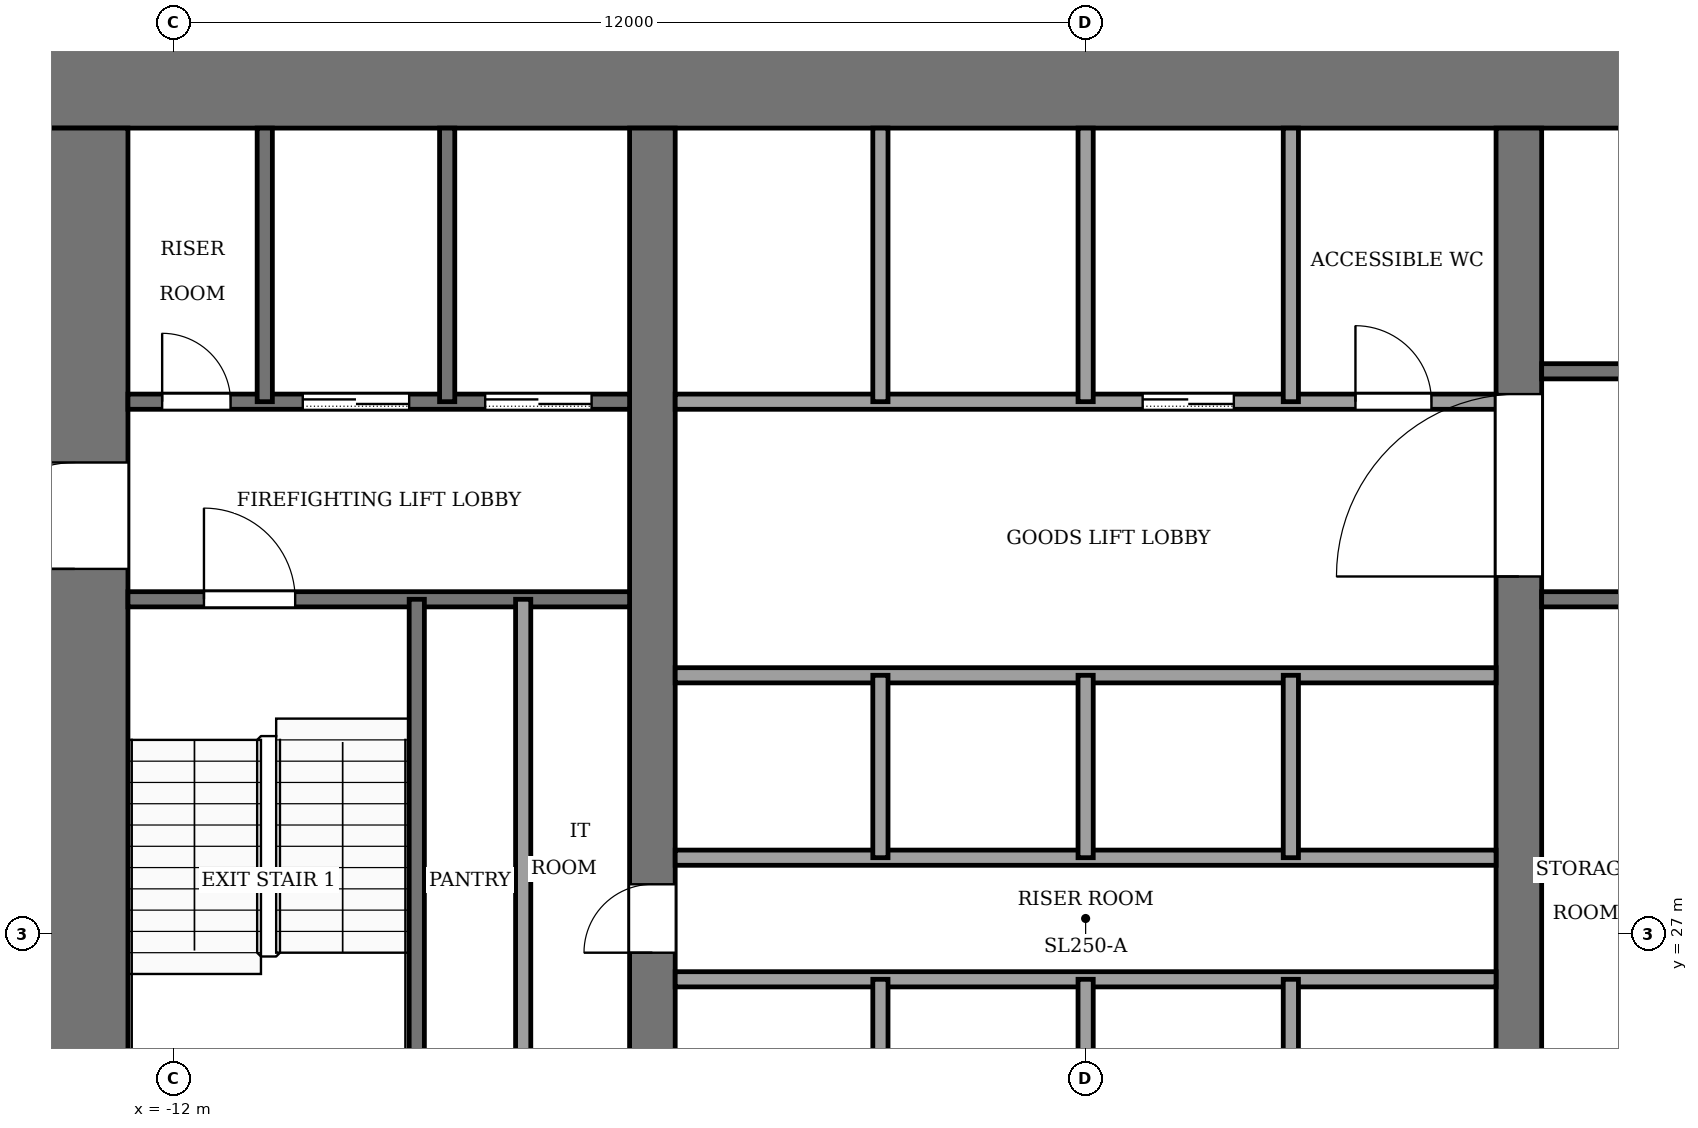
"""IFC4 building model, lengths in metres.
Left out: names, types, materials, properties, quantities, classifications, styles, units other than length and angle.
Written with IfcOpenShell. Run it as: python <this file> out.ifc"""

import sys

from ifc_helpers import new_model, si_unit, direction, frame, frame_2d, origin, place, context, subcontext, project, spatial, rectangle, extrude, element, fill, save


model = new_model("IFC4")
c1 = context("Model", 3, precision=1e-05, world=origin(), true_north=direction((0.0, 1.0)))
c2 = subcontext(c1, "Body", "Model", "MODEL_VIEW")
j1 = project(units=[si_unit("LENGTHUNIT", "METRE"), si_unit("PLANEANGLEUNIT", "RADIAN")], contexts=[c1])
p1 = place(None, origin())
s1 = spatial("IfcSite", under=j1, at=p1, CompositionType="ELEMENT")
p2 = place(p1, origin())
s2 = spatial("IfcBuilding", under=s1, at=p2, CompositionType="ELEMENT")
p3 = place(p2, frame((0.0, 0.0, 30.0)))
s3 = spatial("IfcBuildingStorey", under=s2, at=p3, CompositionType="ELEMENT", Elevation=30.0)
p4 = place(p3, frame((-14.0, 38.3, -0.13), z_axis=(0.0, 0.0, 1.0), x_axis=(1.0, 0.0, 0.0)))
e1 = element("IfcWall", 1, at=p4, inside=s3, PredefinedType="SHEAR", context=c2, shape_type="SweptSolid", body=[
    extrude(rectangle(XDim=28.0, YDim=1.4, at=frame_2d((14.0, 0.0))), origin(), (0.0, 0.0, 1.0), 4.0),
])
p5 = place(p3, frame((-13.3, 18.4, -0.13), z_axis=(0.0, 0.0, 1.0), x_axis=(0.0, 1.0, 0.0)))
e2 = element("IfcWall", 2, at=p5, inside=s3, PredefinedType="SHEAR", context=c2, shape_type="SweptSolid", body=[
    extrude(rectangle(XDim=19.2, YDim=1.4, at=frame_2d((9.6, 0.0))), origin(), (0.0, 0.0, 1.0), 4.0),
])
p6 = place(p5, frame((2.8, 0.0, 0.13)))
e3 = element("IfcOpeningElement", 3, at=p6, cuts=e2, PredefinedType="OPENING", context=c2, shape_type="SweptSolid", body=[
    extrude(rectangle(XDim=2.4, YDim=2.4, at=frame_2d((1.2, 1.2))), frame((0.0, 0.71, 0.0), z_axis=(0.0, -1.0, 0.0), x_axis=(1.0, 0.0, 0.0)), (0.0, 0.0, 1.0), 1.42),
])
p7 = place(p5, frame((13.4, 0.0, 0.13)))
e4 = element("IfcOpeningElement", 4, at=p7, cuts=e2, PredefinedType="OPENING", context=c2, shape_type="SweptSolid", body=[
    extrude(rectangle(XDim=1.4, YDim=2.2, at=frame_2d((0.7, 1.1))), frame((0.0, 0.71, 0.0), z_axis=(0.0, -1.0, 0.0), x_axis=(1.0, 0.0, 0.0)), (0.0, 0.0, 1.0), 1.42),
])
p8 = place(p3, frame((-5.7, 18.4, -0.13), z_axis=(0.0, 0.0, 1.0), x_axis=(0.0, 1.0, 0.0)))
e5 = element("IfcWall", 5, at=p8, inside=s3, PredefinedType="SHEAR", context=c2, shape_type="SweptSolid", body=[
    extrude(rectangle(XDim=19.2, YDim=0.6, at=frame_2d((9.6, 0.0))), origin(), (0.0, 0.0, 1.0), 4.0),
])
p9 = place(p8, frame((8.35, 0.0, 0.13)))
e6 = element("IfcOpeningElement", 6, at=p9, cuts=e5, PredefinedType="OPENING", context=c2, shape_type="SweptSolid", body=[
    extrude(rectangle(XDim=0.9, YDim=2.1, at=frame_2d((0.45, 1.05))), frame((0.0, 0.31, 0.0), z_axis=(0.0, -1.0, 0.0), x_axis=(1.0, 0.0, 0.0)), (0.0, 0.0, 1.0), 0.62),
])
p10 = place(p3, frame((5.7, 18.4, -0.13), z_axis=(0.0, 0.0, 1.0), x_axis=(0.0, 1.0, 0.0)))
e7 = element("IfcWall", 7, at=p10, inside=s3, PredefinedType="SHEAR", context=c2, shape_type="SweptSolid", body=[
    extrude(rectangle(XDim=19.2, YDim=0.6, at=frame_2d((9.6, 0.0))), origin(), (0.0, 0.0, 1.0), 4.0),
])
p11 = place(p10, frame((13.3, 0.0, 0.13)))
e8 = element("IfcOpeningElement", 8, at=p11, cuts=e7, PredefinedType="OPENING", context=c2, shape_type="SweptSolid", body=[
    extrude(rectangle(XDim=2.4, YDim=2.4, at=frame_2d((1.2, 1.2))), frame((0.0, 0.31, 0.0), z_axis=(0.0, -1.0, 0.0), x_axis=(1.0, 0.0, 0.0)), (0.0, 0.0, 1.0), 0.62),
])
for number, where, z_axis, x_axis in (
    (9, (-5.4, 26.4, 0.0), (0.0, 0.0, 1.0), (1.0, 0.0, 0.0)),
    (10, (-5.4, 28.0, 0.0), (0.0, 0.0, 1.0), (1.0, 0.0, 0.0)),
    (11, (-5.4, 30.4, 0.0), (0.0, 0.0, 1.0), (1.0, 0.0, 0.0)),
):
    element("IfcWall", number, at=place(p3, frame(where, z_axis=z_axis, x_axis=x_axis)), inside=s3, PredefinedType="PARTITIONING", context=c2, shape_type="SweptSolid", body=[
        extrude(rectangle(XDim=10.8, YDim=0.2, at=frame_2d((5.4, 0.0))), origin(), (0.0, 0.0, 1.0), 3.87),
    ])
p12 = place(p3, frame((-12.6, 31.4, 0.0), z_axis=(0.0, 0.0, 1.0), x_axis=(1.0, 0.0, 0.0)))
e12 = element("IfcWall", 12, at=p12, inside=s3, PredefinedType="PARTITIONING", context=c2, shape_type="SweptSolid", body=[
    extrude(rectangle(XDim=6.6, YDim=0.2, at=frame_2d((3.3, 0.0))), origin(), (0.0, 0.0, 1.0), 3.87),
])
p13 = place(p12, frame((1.0, 0.0, 0.0)))
e13 = element("IfcOpeningElement", 13, at=p13, cuts=e12, PredefinedType="OPENING", context=c2, shape_type="SweptSolid", body=[
    extrude(rectangle(XDim=1.2, YDim=2.2, at=frame_2d((0.6, 1.1))), frame((0.0, 0.11, 0.0), z_axis=(0.0, -1.0, 0.0), x_axis=(1.0, 0.0, 0.0)), (0.0, 0.0, 1.0), 0.22),
])
p14 = place(p3, frame((6.0, 31.4, 0.0), z_axis=(0.0, 0.0, 1.0), x_axis=(1.0, 0.0, 0.0)))
e14 = element("IfcWall", 14, at=p14, inside=s3, PredefinedType="PARTITIONING", context=c2, shape_type="SweptSolid", body=[
    extrude(rectangle(XDim=6.6, YDim=0.2, at=frame_2d((3.3, 0.0))), origin(), (0.0, 0.0, 1.0), 3.87),
])
p15 = place(p3, frame((-12.6, 34.0, 0.0), z_axis=(0.0, 0.0, 1.0), x_axis=(1.0, 0.0, 0.0)))
e15 = element("IfcWall", 15, at=p15, inside=s3, PredefinedType="PARTITIONING", context=c2, shape_type="SweptSolid", body=[
    extrude(rectangle(XDim=6.6, YDim=0.2, at=frame_2d((3.3, 0.0))), origin(), (0.0, 0.0, 1.0), 3.87),
])
p16 = place(p15, frame((4.7, 0.0, 0.0)))
e16 = element("IfcOpeningElement", 16, at=p16, cuts=e15, PredefinedType="OPENING", context=c2, shape_type="SweptSolid", body=[
    extrude(rectangle(XDim=1.4, YDim=2.2, at=frame_2d((0.7, 1.1))), frame((0.0, 0.11, 0.0), z_axis=(0.0, -1.0, 0.0), x_axis=(1.0, 0.0, 0.0)), (0.0, 0.0, 1.0), 0.22),
])
p17 = place(p15, frame((2.3, 0.0, 0.0)))
e17 = element("IfcOpeningElement", 17, at=p17, cuts=e15, PredefinedType="OPENING", context=c2, shape_type="SweptSolid", body=[
    extrude(rectangle(XDim=1.4, YDim=2.2, at=frame_2d((0.7, 1.1))), frame((0.0, 0.11, 0.0), z_axis=(0.0, -1.0, 0.0), x_axis=(1.0, 0.0, 0.0)), (0.0, 0.0, 1.0), 0.22),
])
p18 = place(p15, frame((0.45, 0.0, 0.0)))
e18 = element("IfcOpeningElement", 18, at=p18, cuts=e15, PredefinedType="OPENING", context=c2, shape_type="SweptSolid", body=[
    extrude(rectangle(XDim=0.9, YDim=2.1, at=frame_2d((0.45, 1.05))), frame((0.0, 0.11, 0.0), z_axis=(0.0, -1.0, 0.0), x_axis=(1.0, 0.0, 0.0)), (0.0, 0.0, 1.0), 0.22),
])
p19 = place(p3, frame((-5.4, 34.0, 0.0), z_axis=(0.0, 0.0, 1.0), x_axis=(1.0, 0.0, 0.0)))
e19 = element("IfcWall", 19, at=p19, inside=s3, PredefinedType="PARTITIONING", context=c2, shape_type="SweptSolid", body=[
    extrude(rectangle(XDim=10.8, YDim=0.2, at=frame_2d((5.4, 0.0))), origin(), (0.0, 0.0, 1.0), 3.87),
])
p20 = place(p19, frame((6.15, 0.0, 0.0)))
e20 = element("IfcOpeningElement", 20, at=p20, cuts=e19, PredefinedType="OPENING", context=c2, shape_type="SweptSolid", body=[
    extrude(rectangle(XDim=1.2, YDim=2.2, at=frame_2d((0.6, 1.1))), frame((0.0, 0.11, 0.0), z_axis=(0.0, -1.0, 0.0), x_axis=(1.0, 0.0, 0.0)), (0.0, 0.0, 1.0), 0.22),
])
p21 = place(p19, frame((8.95, 0.0, 0.0)))
e21 = element("IfcOpeningElement", 21, at=p21, cuts=e19, PredefinedType="OPENING", context=c2, shape_type="SweptSolid", body=[
    extrude(rectangle(XDim=1.0, YDim=2.1, at=frame_2d((0.5, 1.05))), frame((0.0, 0.11, 0.0), z_axis=(0.0, -1.0, 0.0), x_axis=(1.0, 0.0, 0.0)), (0.0, 0.0, 1.0), 0.22),
])
p22 = place(p3, frame((6.0, 34.4, 0.0), z_axis=(0.0, 0.0, 1.0), x_axis=(1.0, 0.0, 0.0)))
e22 = element("IfcWall", 22, at=p22, inside=s3, PredefinedType="PARTITIONING", context=c2, shape_type="SweptSolid", body=[
    extrude(rectangle(XDim=6.6, YDim=0.2, at=frame_2d((3.3, 0.0))), origin(), (0.0, 0.0, 1.0), 3.87),
])
p23 = place(p22, frame((4.8, 0.0, 0.0)))
e23 = element("IfcOpeningElement", 23, at=p23, cuts=e22, PredefinedType="OPENING", context=c2, shape_type="SweptSolid", body=[
    extrude(rectangle(XDim=1.2, YDim=2.2, at=frame_2d((0.6, 1.1))), frame((0.0, 0.11, 0.0), z_axis=(0.0, -1.0, 0.0), x_axis=(1.0, 0.0, 0.0)), (0.0, 0.0, 1.0), 0.22),
])
p24 = place(p3, frame((-10.8, 34.0, 0.0), z_axis=(0.0, 0.0, 1.0), x_axis=(0.0, 1.0, 0.0)))
e24 = element("IfcWall", 24, at=p24, inside=s3, PredefinedType="PARTITIONING", context=c2, shape_type="SweptSolid", body=[
    extrude(rectangle(XDim=3.6, YDim=0.2, at=frame_2d((1.8, 0.0))), origin(), (0.0, 0.0, 1.0), 3.87),
])
p25 = place(p3, frame((-8.8, 24.0, 0.0), z_axis=(0.0, 0.0, 1.0), x_axis=(0.0, 1.0, 0.0)))
e25 = element("IfcWall", 25, at=p25, inside=s3, PredefinedType="PARTITIONING", context=c2, shape_type="SweptSolid", body=[
    extrude(rectangle(XDim=7.4, YDim=0.2, at=frame_2d((3.7, 0.0))), origin(), (0.0, 0.0, 1.0), 3.87),
])
p26 = place(p3, frame((-8.4, 34.0, 0.0), z_axis=(0.0, 0.0, 1.0), x_axis=(0.0, 1.0, 0.0)))
e26 = element("IfcWall", 26, at=p26, inside=s3, PredefinedType="PARTITIONING", context=c2, shape_type="SweptSolid", body=[
    extrude(rectangle(XDim=3.6, YDim=0.2, at=frame_2d((1.8, 0.0))), origin(), (0.0, 0.0, 1.0), 3.87),
])
p27 = place(p3, frame((-7.4, 24.0, 0.0), z_axis=(0.0, 0.0, 1.0), x_axis=(0.0, 1.0, 0.0)))
e27 = element("IfcWall", 27, at=p27, inside=s3, PredefinedType="PARTITIONING", context=c2, shape_type="SweptSolid", body=[
    extrude(rectangle(XDim=7.4, YDim=0.2, at=frame_2d((3.7, 0.0))), origin(), (0.0, 0.0, 1.0), 3.87),
])
for number, where, z_axis, x_axis in (
    (28, (-2.7, 24.0, 0.0), (0.0, 0.0, 1.0), (0.0, 1.0, 0.0)),
    (29, (-2.7, 28.0, 0.0), (0.0, 0.0, 1.0), (0.0, 1.0, 0.0)),
):
    element("IfcWall", number, at=place(p3, frame(where, z_axis=z_axis, x_axis=x_axis)), inside=s3, PredefinedType="PARTITIONING", context=c2, shape_type="SweptSolid", body=[
        extrude(rectangle(XDim=2.4, YDim=0.2, at=frame_2d((1.2, 0.0))), origin(), (0.0, 0.0, 1.0), 3.87),
    ])
p28 = place(p3, frame((-2.7, 34.0, 0.0), z_axis=(0.0, 0.0, 1.0), x_axis=(0.0, 1.0, 0.0)))
e30 = element("IfcWall", 30, at=p28, inside=s3, PredefinedType="PARTITIONING", context=c2, shape_type="SweptSolid", body=[
    extrude(rectangle(XDim=3.6, YDim=0.2, at=frame_2d((1.8, 0.0))), origin(), (0.0, 0.0, 1.0), 3.87),
])
for number, where, z_axis, x_axis in (
    (31, (0.0, 24.0, 0.0), (0.0, 0.0, 1.0), (0.0, 1.0, 0.0)),
    (32, (0.0, 28.0, 0.0), (0.0, 0.0, 1.0), (0.0, 1.0, 0.0)),
):
    element("IfcWall", number, at=place(p3, frame(where, z_axis=z_axis, x_axis=x_axis)), inside=s3, PredefinedType="PARTITIONING", context=c2, shape_type="SweptSolid", body=[
        extrude(rectangle(XDim=2.4, YDim=0.2, at=frame_2d((1.2, 0.0))), origin(), (0.0, 0.0, 1.0), 3.87),
    ])
p29 = place(p3, frame((0.0, 34.0, 0.0), z_axis=(0.0, 0.0, 1.0), x_axis=(0.0, 1.0, 0.0)))
e33 = element("IfcWall", 33, at=p29, inside=s3, PredefinedType="PARTITIONING", context=c2, shape_type="SweptSolid", body=[
    extrude(rectangle(XDim=3.6, YDim=0.2, at=frame_2d((1.8, 0.0))), origin(), (0.0, 0.0, 1.0), 3.87),
])
for number, where, z_axis, x_axis in (
    (34, (2.7, 24.0, 0.0), (0.0, 0.0, 1.0), (0.0, 1.0, 0.0)),
    (35, (2.7, 28.0, 0.0), (0.0, 0.0, 1.0), (0.0, 1.0, 0.0)),
):
    element("IfcWall", number, at=place(p3, frame(where, z_axis=z_axis, x_axis=x_axis)), inside=s3, PredefinedType="PARTITIONING", context=c2, shape_type="SweptSolid", body=[
        extrude(rectangle(XDim=2.4, YDim=0.2, at=frame_2d((1.2, 0.0))), origin(), (0.0, 0.0, 1.0), 3.87),
    ])
p30 = place(p3, frame((2.7, 34.0, 0.0), z_axis=(0.0, 0.0, 1.0), x_axis=(0.0, 1.0, 0.0)))
e36 = element("IfcWall", 36, at=p30, inside=s3, PredefinedType="PARTITIONING", context=c2, shape_type="SweptSolid", body=[
    extrude(rectangle(XDim=3.6, YDim=0.2, at=frame_2d((1.8, 0.0))), origin(), (0.0, 0.0, 1.0), 3.87),
])
p31 = place(p20, origin())
e37 = element("IfcDoor", 37, at=p31, inside=s3, OperationType="SLIDING_TO_LEFT", PredefinedType="DOOR", context=c2, shape_type="SweptSolid", body=[
    extrude(rectangle(XDim=1.2, YDim=2.2, at=frame_2d((0.6, 1.1))), frame((0.0, 0.025, 0.0), z_axis=(0.0, -1.0, 0.0), x_axis=(1.0, 0.0, 0.0)), (0.0, 0.0, 1.0), 0.05),
])
fill(e20, e37)
p32 = place(p16, origin())
e38 = element("IfcDoor", 38, at=p32, inside=s3, OperationType="SLIDING_TO_LEFT", PredefinedType="DOOR", context=c2, shape_type="SweptSolid", body=[
    extrude(rectangle(XDim=1.4, YDim=2.2, at=frame_2d((0.7, 1.1))), frame((0.0, 0.025, 0.0), z_axis=(0.0, -1.0, 0.0), x_axis=(1.0, 0.0, 0.0)), (0.0, 0.0, 1.0), 0.05),
])
fill(e16, e38)
p33 = place(p17, origin())
e39 = element("IfcDoor", 39, at=p33, inside=s3, OperationType="SLIDING_TO_LEFT", PredefinedType="DOOR", context=c2, shape_type="SweptSolid", body=[
    extrude(rectangle(XDim=1.4, YDim=2.2, at=frame_2d((0.7, 1.1))), frame((0.0, 0.025, 0.0), z_axis=(0.0, -1.0, 0.0), x_axis=(1.0, 0.0, 0.0)), (0.0, 0.0, 1.0), 0.05),
])
fill(e17, e39)
p34 = place(p18, origin())
e40 = element("IfcDoor", 40, at=p34, inside=s3, OperationType="SINGLE_SWING_RIGHT", PredefinedType="DOOR", context=c2, shape_type="SweptSolid", body=[
    extrude(rectangle(XDim=0.9, YDim=2.1, at=frame_2d((0.45, 1.05))), frame((0.0, 0.025, 0.0), z_axis=(0.0, -1.0, 0.0), x_axis=(1.0, 0.0, 0.0)), (0.0, 0.0, 1.0), 0.05),
])
fill(e18, e40)
p35 = place(p21, origin())
e41 = element("IfcDoor", 41, at=p35, inside=s3, OperationType="SINGLE_SWING_LEFT", PredefinedType="DOOR", context=c2, shape_type="SweptSolid", body=[
    extrude(rectangle(XDim=1.0, YDim=2.1, at=frame_2d((0.5, 1.05))), frame((0.0, 0.025, 0.0), z_axis=(0.0, -1.0, 0.0), x_axis=(1.0, 0.0, 0.0)), (0.0, 0.0, 1.0), 0.05),
])
fill(e21, e41)
p36 = place(p9, origin())
e42 = element("IfcDoor", 42, at=p36, inside=s3, OperationType="SINGLE_SWING_RIGHT", PredefinedType="DOOR", context=c2, shape_type="SweptSolid", body=[
    extrude(rectangle(XDim=0.9, YDim=2.1, at=frame_2d((0.45, 1.05))), frame((0.0, 0.025, 0.0), z_axis=(0.0, -1.0, 0.0), x_axis=(1.0, 0.0, 0.0)), (0.0, 0.0, 1.0), 0.05),
])
fill(e6, e42)
p37 = place(p13, origin())
e43 = element("IfcDoor", 43, at=p37, inside=s3, OperationType="SINGLE_SWING_RIGHT", PredefinedType="DOOR", context=c2, shape_type="SweptSolid", body=[
    extrude(rectangle(XDim=1.2, YDim=2.2, at=frame_2d((0.6, 1.1))), frame((0.0, 0.025, 0.0), z_axis=(0.0, -1.0, 0.0), x_axis=(1.0, 0.0, 0.0)), (0.0, 0.0, 1.0), 0.05),
])
fill(e13, e43)
p38 = place(p11, origin())
e44 = element("IfcDoor", 44, at=p38, inside=s3, OperationType="DOUBLE_DOOR_SINGLE_SWING", PredefinedType="DOOR", context=c2, shape_type="SweptSolid", body=[
    extrude(rectangle(XDim=2.4, YDim=2.4, at=frame_2d((1.2, 1.2))), frame((0.0, 0.025, 0.0), z_axis=(0.0, -1.0, 0.0), x_axis=(1.0, 0.0, 0.0)), (0.0, 0.0, 1.0), 0.05),
])
fill(e8, e44)
p39 = place(p7, origin())
e45 = element("IfcDoor", 45, at=p39, inside=s3, OperationType="SINGLE_SWING_RIGHT", PredefinedType="DOOR", context=c2, shape_type="SweptSolid", body=[
    extrude(rectangle(XDim=1.4, YDim=2.2, at=frame_2d((0.7, 1.1))), frame((0.0, 0.025, 0.0), z_axis=(0.0, -1.0, 0.0), x_axis=(1.0, 0.0, 0.0)), (0.0, 0.0, 1.0), 0.05),
])
fill(e4, e45)
save(model, sys.argv[1])
